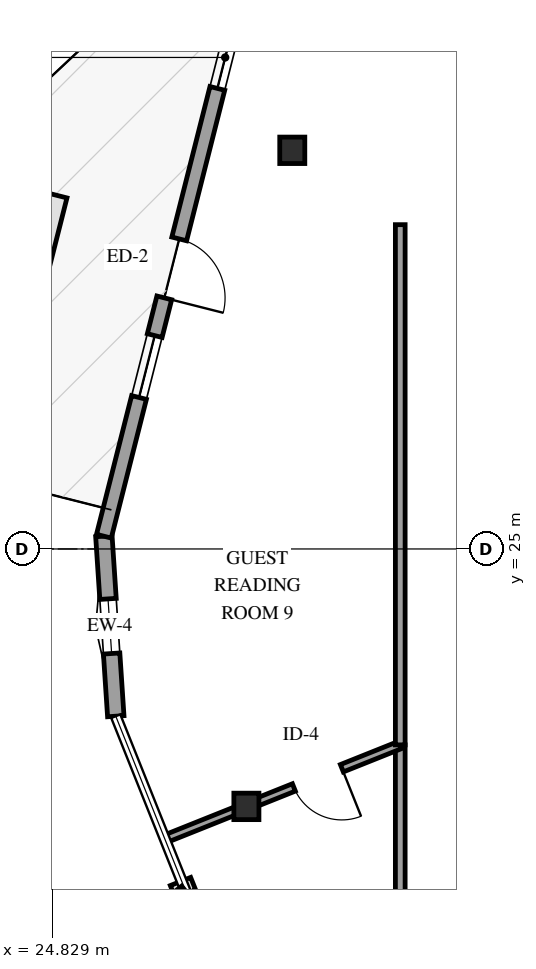
"""IFC4 building model, lengths in metres.
Left out: names, types, materials, properties, quantities, classifications, styles, units other than length and angle.
Written with IfcOpenShell. Run it as: python <this file> out.ifc"""

import sys

from ifc_helpers import new_model, si_unit, direction, frame, frame_2d, origin, origin_2d, place, context, subcontext, project, spatial, rectangle, i_section, extrude, element, fill, save


model = new_model("IFC4")
c1 = context("Model", 3, precision=1e-05, world=origin(), true_north=direction((0.0, 1.0)))
c2 = subcontext(c1, "Body", "Model", "MODEL_VIEW")
j1 = project(units=[si_unit("LENGTHUNIT", "METRE"), si_unit("PLANEANGLEUNIT", "RADIAN")], contexts=[c1])
p1 = place(None, origin())
s1 = spatial("IfcSite", under=j1, at=p1, CompositionType="ELEMENT")
p2 = place(p1, origin())
s2 = spatial("IfcBuilding", under=s1, at=p2, CompositionType="ELEMENT")
p3 = place(p2, frame((0.0, 0.0, 178.6)))
s3 = spatial("IfcBuildingStorey", under=s2, at=p3, CompositionType="ELEMENT", Elevation=178.6)
for number, where, z_axis, x_axis in (
    (1, (28.774, 31.556, 0.0), (0.0, 0.0, 1.0), (1.0, 0.0, 0.0)),
    (2, (28.02, 20.766, 0.0), (0.0, 0.0, 1.0), (1.0, 0.0, 0.0)),
):
    element("IfcColumn", number, at=place(p3, frame(where, z_axis=z_axis, x_axis=x_axis)), inside=s3, PredefinedType="COLUMN", context=c2, shape_type="SweptSolid", body=[
        extrude(i_section(OverallWidth=0.412, OverallDepth=0.435, WebThickness=0.036, FlangeThickness=0.057, FilletRadius=0.038, at=origin_2d()), origin(), (0.0, 0.0, 1.0), 3.6),
    ])
p4 = place(p3, frame((25.676, 25.21, 0.0), z_axis=(0.0, 0.0, 1.0), x_axis=(0.065923586617, -0.997824674343, 0.0)))
e3 = element("IfcWall", 3, at=p4, inside=s3, PredefinedType="SOLIDWALL", context=c2, shape_type="SweptSolid", body=[
    extrude(rectangle(XDim=2.966, YDim=0.27, at=frame_2d((1.483, 0.0))), origin(), (0.0, 0.0, 1.0), 2.679),
])
p5 = place(p4, frame((1.033, 0.0, 0.75)))
e4 = element("IfcOpeningElement", 4, at=p5, cuts=e3, PredefinedType="OPENING", context=c2, shape_type="SweptSolid", body=[
    extrude(rectangle(XDim=0.9, YDim=1.5, at=frame_2d((0.45, 0.75))), frame((0.0, 0.145, 0.0), z_axis=(0.0, -1.0, 0.0), x_axis=(1.0, 0.0, 0.0)), (0.0, 0.0, 1.0), 0.29),
])
p6 = place(p3, frame((27.908, 34.018, 0.0), z_axis=(0.0, 0.0, 1.0), x_axis=(-0.245644624453, -0.969359952999, 0.0)))
e5 = element("IfcWall", 5, at=p6, inside=s3, PredefinedType="SOLIDWALL", context=c2, shape_type="SweptSolid", body=[
    extrude(rectangle(XDim=9.087, YDim=0.25, at=frame_2d((4.543, 0.0))), origin(), (0.0, 0.0, 1.0), 2.679),
])
p7 = place(p6, frame((4.043, 0.0, 0.0)))
e6 = element("IfcOpeningElement", 6, at=p7, cuts=e5, PredefinedType="OPENING", context=c2, shape_type="SweptSolid", body=[
    extrude(rectangle(XDim=1.0, YDim=2.15, at=frame_2d((0.5, 1.075))), frame((0.0, 0.135, 0.0), z_axis=(0.0, -1.0, 0.0), x_axis=(1.0, 0.0, 0.0)), (0.0, 0.0, 1.0), 0.27),
])
p8 = place(p6, frame((0.44, 0.0, 0.72)))
e7 = element("IfcOpeningElement", 7, at=p8, cuts=e5, PredefinedType="OPENING", context=c2, shape_type="SweptSolid", body=[
    extrude(rectangle(XDim=1.05, YDim=1.55, at=frame_2d((0.525, 0.775))), frame((0.0, 0.135, 0.0), z_axis=(0.0, -1.0, 0.0), x_axis=(1.0, 0.0, 0.0)), (0.0, 0.0, 1.0), 0.27),
])
p9 = place(p6, frame((5.684, 0.0, 0.72)))
e8 = element("IfcOpeningElement", 8, at=p9, cuts=e5, PredefinedType="OPENING", context=c2, shape_type="SweptSolid", body=[
    extrude(rectangle(XDim=1.05, YDim=1.55, at=frame_2d((0.525, 0.775))), frame((0.0, 0.135, 0.0), z_axis=(0.0, -1.0, 0.0), x_axis=(1.0, 0.0, 0.0)), (0.0, 0.0, 1.0), 0.27),
])
p10 = place(p3, frame((30.55, 12.05, 0.0), z_axis=(0.0, 0.0, 1.0), x_axis=(0.0, 1.0, 0.0)))
e9 = element("IfcWall", 9, at=p10, inside=s3, PredefinedType="PARTITIONING", context=c2, shape_type="SweptSolid", body=[
    extrude(rectangle(XDim=9.728, YDim=0.16, at=frame_2d((4.864, 0.0))), origin(), (0.0, 0.0, 1.0), 3.3),
])
p11 = place(p3, frame((30.55, 21.778, 0.0), z_axis=(0.0, 0.0, 1.0), x_axis=(-0.928504957858, -0.371320001121, 0.0)))
e10 = element("IfcWall", 10, at=p11, inside=s3, PredefinedType="PARTITIONING", context=c2, shape_type="SweptSolid", body=[
    extrude(rectangle(XDim=4.169, YDim=0.13, at=frame_2d((2.084, 0.0))), origin(), (0.0, 0.0, 1.0), 3.3),
])
p12 = place(p11, frame((1.034, 0.0, 0.0)))
e11 = element("IfcOpeningElement", 11, at=p12, cuts=e10, PredefinedType="OPENING", context=c2, shape_type="SweptSolid", body=[
    extrude(rectangle(XDim=0.85, YDim=2.1, at=frame_2d((0.425, 1.05))), frame((0.0, 0.075, 0.0), z_axis=(0.0, -1.0, 0.0), x_axis=(1.0, 0.0, 0.0)), (0.0, 0.0, 1.0), 0.15),
])
p13 = place(p3, frame((30.55, 21.778, 0.0), z_axis=(0.0, 0.0, 1.0), x_axis=(0.0, 1.0, 0.0)))
e12 = element("IfcWall", 12, at=p13, inside=s3, PredefinedType="PARTITIONING", context=c2, shape_type="SweptSolid", body=[
    extrude(rectangle(XDim=8.555, YDim=0.16, at=frame_2d((4.277, 0.0))), origin(), (0.0, 0.0, 1.0), 3.3),
])
p14 = place(p5, origin())
e13 = element("IfcWindow", 13, at=p14, inside=s3, PartitioningType="SINGLE_PANEL", PredefinedType="WINDOW", context=c2, shape_type="SweptSolid", body=[
    extrude(rectangle(XDim=0.9, YDim=1.5, at=frame_2d((0.45, 0.75))), frame((0.0, 0.03, 0.0), z_axis=(0.0, -1.0, 0.0), x_axis=(1.0, 0.0, 0.0)), (0.0, 0.0, 1.0), 0.06),
])
fill(e4, e13)
p15 = place(p7, origin())
e14 = element("IfcDoor", 14, at=p15, inside=s3, OperationType="SINGLE_SWING_RIGHT", PredefinedType="DOOR", context=c2, shape_type="SweptSolid", body=[
    extrude(rectangle(XDim=1.0, YDim=2.15, at=frame_2d((0.5, 1.075))), frame((0.0, 0.025, 0.0), z_axis=(0.0, -1.0, 0.0), x_axis=(1.0, 0.0, 0.0)), (0.0, 0.0, 1.0), 0.05),
])
fill(e6, e14)
p16 = place(p8, origin())
e15 = element("IfcWindow", 15, at=p16, inside=s3, PartitioningType="SINGLE_PANEL", PredefinedType="WINDOW", context=c2, shape_type="SweptSolid", body=[
    extrude(rectangle(XDim=1.05, YDim=1.55, at=frame_2d((0.525, 0.775))), frame((0.0, 0.03, 0.0), z_axis=(0.0, -1.0, 0.0), x_axis=(1.0, 0.0, 0.0)), (0.0, 0.0, 1.0), 0.06),
])
fill(e7, e15)
p17 = place(p9, origin())
e16 = element("IfcWindow", 16, at=p17, inside=s3, PartitioningType="SINGLE_PANEL", PredefinedType="WINDOW", context=c2, shape_type="SweptSolid", body=[
    extrude(rectangle(XDim=1.05, YDim=1.55, at=frame_2d((0.525, 0.775))), frame((0.0, 0.03, 0.0), z_axis=(0.0, -1.0, 0.0), x_axis=(1.0, 0.0, 0.0)), (0.0, 0.0, 1.0), 0.06),
])
fill(e8, e16)
p18 = place(p12, origin())
e17 = element("IfcDoor", 17, at=p18, inside=s3, OperationType="SINGLE_SWING_LEFT", PredefinedType="DOOR", context=c2, shape_type="SweptSolid", body=[
    extrude(rectangle(XDim=0.85, YDim=2.1, at=frame_2d((0.425, 1.05))), frame((0.0, 0.025, 0.0), z_axis=(0.0, -1.0, 0.0), x_axis=(1.0, 0.0, 0.0)), (0.0, 0.0, 1.0), 0.05),
])
fill(e11, e17)
save(model, sys.argv[1])
